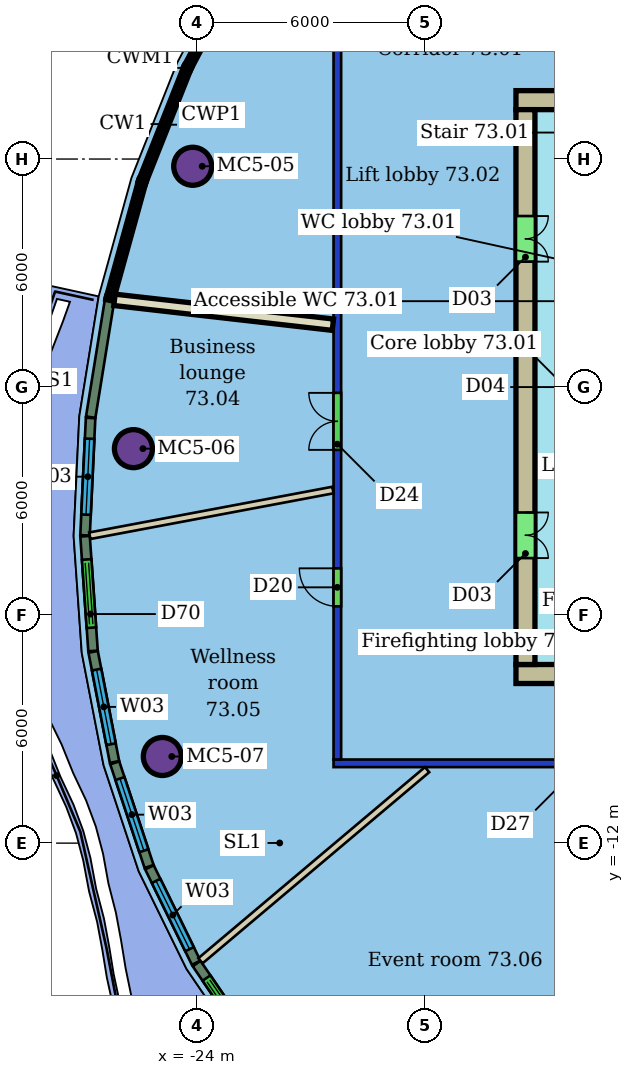
"""IFC4 building model, lengths in metres.
Left out: names, types, materials, properties, quantities, classifications, styles, units other than length and angle.
Written with IfcOpenShell. Run it as: python <this file> out.ifc"""

import sys

from ifc_helpers import new_model, si_unit, direction, frame, frame_2d, origin, origin_2d, place, context, subcontext, project, spatial, rectangle, hollow_circle, extrude, element, fill, save


model = new_model("IFC4")
c1 = context("Model", 3, precision=1e-05, world=origin(), true_north=direction((0.0, 1.0)))
c2 = subcontext(c1, "Body", "Model", "MODEL_VIEW")
j1 = project(units=[si_unit("LENGTHUNIT", "METRE"), si_unit("PLANEANGLEUNIT", "RADIAN")], contexts=[c1])
p1 = place(None, origin())
s1 = spatial("IfcSite", under=j1, at=p1, CompositionType="ELEMENT")
p2 = place(p1, origin())
s2 = spatial("IfcBuilding", under=s1, at=p2, CompositionType="ELEMENT")
p3 = place(p2, frame((0.0, 0.0, 293.7)))
s3 = spatial("IfcBuildingStorey", under=s2, at=p3, CompositionType="ELEMENT", Elevation=293.7)
for number, where, z_axis, x_axis in (
    (1, (-24.106, 5.81, 0.0), (0.0, 0.0, 1.0), (1.0, 0.0, 0.0)),
    (2, (-25.666, -1.62, 0.0), (0.0, 0.0, 1.0), (1.0, 0.0, 0.0)),
    (3, (-24.906, -9.72, 0.0), (0.0, 0.0, 1.0), (1.0, 0.0, 0.0)),
):
    element("IfcColumn", number, at=place(p3, frame(where, z_axis=z_axis, x_axis=x_axis)), inside=s3, PredefinedType="COLUMN", context=c2, shape_type="SweptSolid", body=[
        extrude(hollow_circle(Radius=0.5, WallThickness=0.04, at=origin_2d()), origin(), (0.0, 0.0, 1.0), 3.45),
    ])
p4 = place(p3, frame((8.4, -9.9, 0.0), z_axis=(0.0, 0.0, 1.0), x_axis=(-1.0, 0.0, 0.0)))
e4 = element("IfcWall", 4, at=p4, inside=s3, PredefinedType="PARTITIONING", context=c2, shape_type="SweptSolid", body=[
    extrude(rectangle(XDim=28.8, YDim=0.2, at=frame_2d((14.4, 0.0))), origin(), (0.0, 0.0, 1.0), 3.1),
])
p5 = place(p4, frame((20.815, 0.0, 0.0)))
e5 = element("IfcOpeningElement", 5, at=p5, cuts=e4, PredefinedType="OPENING", context=c2, shape_type="SweptSolid", body=[
    extrude(rectangle(XDim=1.8, YDim=2.4, at=frame_2d((0.9, 1.2))), frame((0.0, 0.11, 0.0), z_axis=(0.0, -1.0, 0.0), x_axis=(1.0, 0.0, 0.0)), (0.0, 0.0, 1.0), 0.22),
])
p6 = place(p4, frame((16.021, 0.0, 0.0)))
e6 = element("IfcOpeningElement", 6, at=p6, cuts=e4, PredefinedType="OPENING", context=c2, shape_type="SweptSolid", body=[
    extrude(rectangle(XDim=1.5, YDim=2.1, at=frame_2d((0.75, 1.05))), frame((0.0, 0.11, 0.0), z_axis=(0.0, -1.0, 0.0), x_axis=(1.0, 0.0, 0.0)), (0.0, 0.0, 1.0), 0.22),
])
p7 = place(p4, frame((9.891, 0.0, 0.0)))
e7 = element("IfcOpeningElement", 7, at=p7, cuts=e4, PredefinedType="OPENING", context=c2, shape_type="SweptSolid", body=[
    extrude(rectangle(XDim=0.9, YDim=2.1, at=frame_2d((0.45, 1.05))), frame((0.0, 0.11, 0.0), z_axis=(0.0, -1.0, 0.0), x_axis=(1.0, 0.0, 0.0)), (0.0, 0.0, 1.0), 0.22),
])
p8 = place(p4, frame((4.832, 0.0, 0.0)))
e8 = element("IfcOpeningElement", 8, at=p8, cuts=e4, PredefinedType="OPENING", context=c2, shape_type="SweptSolid", body=[
    extrude(rectangle(XDim=1.5, YDim=2.1, at=frame_2d((0.75, 1.05))), frame((0.0, 0.11, 0.0), z_axis=(0.0, -1.0, 0.0), x_axis=(1.0, 0.0, 0.0)), (0.0, 0.0, 1.0), 0.22),
])
p9 = place(p3, frame((-20.3, -9.8, 0.0), z_axis=(0.0, 0.0, 1.0), x_axis=(0.0, 1.0, 0.0)))
e9 = element("IfcWall", 9, at=p9, inside=s3, PredefinedType="PARTITIONING", context=c2, shape_type="SweptSolid", body=[
    extrude(rectangle(XDim=19.6, YDim=0.2, at=frame_2d((9.8, 0.0))), origin(), (0.0, 0.0, 1.0), 3.1),
])
p10 = place(p9, frame((8.147, 0.0, 0.0)))
e10 = element("IfcOpeningElement", 10, at=p10, cuts=e9, PredefinedType="OPENING", context=c2, shape_type="SweptSolid", body=[
    extrude(rectangle(XDim=1.5, YDim=2.1, at=frame_2d((0.75, 1.05))), frame((0.0, 0.11, 0.0), z_axis=(0.0, -1.0, 0.0), x_axis=(1.0, 0.0, 0.0)), (0.0, 0.0, 1.0), 0.22),
])
p11 = place(p9, frame((4.031, 0.0, 0.0)))
e11 = element("IfcOpeningElement", 11, at=p11, cuts=e9, PredefinedType="OPENING", context=c2, shape_type="SweptSolid", body=[
    extrude(rectangle(XDim=1.0, YDim=2.1, at=frame_2d((0.5, 1.05))), frame((0.0, 0.11, 0.0), z_axis=(0.0, -1.0, 0.0), x_axis=(1.0, 0.0, 0.0)), (0.0, 0.0, 1.0), 0.22),
])
p12 = place(p3, frame((-26.166, 2.295, 0.0), z_axis=(0.0, 0.0, 1.0), x_axis=(0.993584796014, -0.113089580112, 0.0)))
e12 = element("IfcWall", 12, at=p12, inside=s3, PredefinedType="PARTITIONING", context=c2, shape_type="SweptSolid", body=[
    extrude(rectangle(XDim=5.786, YDim=0.3, at=frame_2d((2.893, 0.0))), origin(), (0.0, 0.0, 1.0), 3.45),
])
p13 = place(p3, frame((-26.815, -3.912, 0.0), z_axis=(0.0, 0.0, 1.0), x_axis=(0.982791861664, 0.184716422243, 0.0)))
e13 = element("IfcWall", 13, at=p13, inside=s3, PredefinedType="PARTITIONING", context=c2, shape_type="SweptSolid", body=[
    extrude(rectangle(XDim=6.511, YDim=0.175, at=frame_2d((3.255, 0.0))), origin(), (0.0, 0.0, 1.0), 3.45),
])
p14 = place(p3, frame((-23.902, -15.095, 0.0), z_axis=(0.0, 0.0, 1.0), x_axis=(0.764496313842, 0.644628099079, 0.0)))
e14 = element("IfcWall", 14, at=p14, inside=s3, PredefinedType="PARTITIONING", context=c2, shape_type="SweptSolid", body=[
    extrude(rectangle(XDim=7.801, YDim=0.175, at=frame_2d((3.9, 0.0))), origin(), (0.0, 0.0, 1.0), 3.45),
])
p15 = place(p3, frame((-16.226, -22.213, 0.0), z_axis=(0.0, 0.0, 1.0), x_axis=(0.418174840515, 0.908366557487, 0.0)))
e15 = element("IfcWall", 15, at=p15, inside=s3, PredefinedType="PARTITIONING", context=c2, shape_type="SweptSolid", body=[
    extrude(rectangle(XDim=13.411, YDim=0.15, at=frame_2d((6.706, 0.0))), origin(), (0.0, 0.0, 1.0), 3.45),
])
p16 = place(p3, frame((-26.296, 2.268, 0.0), z_axis=(0.0, 0.0, 1.0), x_axis=(-0.159440477827, -0.987207543544, 0.0)))
e16 = element("IfcWall", 16, at=p16, inside=s3, PredefinedType="SOLIDWALL", context=c2, shape_type="SweptSolid", body=[
    extrude(rectangle(XDim=3.099, YDim=0.25, at=frame_2d((1.55, 0.0))), origin(), (0.0, 0.0, 1.0), 3.15),
])
p17 = place(p3, frame((-26.793, -0.814, 0.0), z_axis=(0.0, 0.0, 1.0), x_axis=(-0.047385042598, -0.998876697965, 0.0)))
e17 = element("IfcWall", 17, at=p17, inside=s3, PredefinedType="SOLIDWALL", context=c2, shape_type="SweptSolid", body=[
    extrude(rectangle(XDim=3.091, YDim=0.25, at=frame_2d((1.546, 0.0))), origin(), (0.0, 0.0, 1.0), 3.15),
])
p18 = place(p17, frame((0.546, 0.0, 0.9)))
e18 = element("IfcOpeningElement", 18, at=p18, cuts=e17, PredefinedType="OPENING", context=c2, shape_type="SweptSolid", body=[
    extrude(rectangle(XDim=2.0, YDim=2.1, at=frame_2d((1.0, 1.05))), frame((0.0, 0.135, 0.0), z_axis=(0.0, -1.0, 0.0), x_axis=(1.0, 0.0, 0.0)), (0.0, 0.0, 1.0), 0.27),
])
p19 = place(p3, frame((-26.939, -3.925, 0.0), z_axis=(0.0, 0.0, 1.0), x_axis=(0.069463827697, -0.997584470931, 0.0)))
e19 = element("IfcWall", 19, at=p19, inside=s3, PredefinedType="SOLIDWALL", context=c2, shape_type="SweptSolid", body=[
    extrude(rectangle(XDim=3.026, YDim=0.25, at=frame_2d((1.513, 0.0))), origin(), (0.0, 0.0, 1.0), 3.15),
])
p20 = place(p19, frame((0.613, 0.0, 0.0)))
e20 = element("IfcOpeningElement", 20, at=p20, cuts=e19, PredefinedType="OPENING", context=c2, shape_type="SweptSolid", body=[
    extrude(rectangle(XDim=1.8, YDim=2.4, at=frame_2d((0.9, 1.2))), frame((0.0, 0.135, 0.0), z_axis=(0.0, -1.0, 0.0), x_axis=(1.0, 0.0, 0.0)), (0.0, 0.0, 1.0), 0.27),
])
p21 = place(p3, frame((-26.726, -6.966, 0.0), z_axis=(0.0, 0.0, 1.0), x_axis=(0.190466761953, -0.981693644978, 0.0)))
e21 = element("IfcWall", 21, at=p21, inside=s3, PredefinedType="SOLIDWALL", context=c2, shape_type="SweptSolid", body=[
    extrude(rectangle(XDim=2.952, YDim=0.25, at=frame_2d((1.476, 0.0))), origin(), (0.0, 0.0, 1.0), 3.15),
])
p22 = place(p21, frame((0.476, 0.0, 0.9)))
e22 = element("IfcOpeningElement", 22, at=p22, cuts=e21, PredefinedType="OPENING", context=c2, shape_type="SweptSolid", body=[
    extrude(rectangle(XDim=2.0, YDim=2.1, at=frame_2d((1.0, 1.05))), frame((0.0, 0.135, 0.0), z_axis=(0.0, -1.0, 0.0), x_axis=(1.0, 0.0, 0.0)), (0.0, 0.0, 1.0), 0.27),
])
p23 = place(p3, frame((-26.157, -9.887, 0.0), z_axis=(0.0, 0.0, 1.0), x_axis=(0.314544485277, -0.949242733331, 0.0)))
e23 = element("IfcWall", 23, at=p23, inside=s3, PredefinedType="SOLIDWALL", context=c2, shape_type="SweptSolid", body=[
    extrude(rectangle(XDim=2.873, YDim=0.25, at=frame_2d((1.436, 0.0))), origin(), (0.0, 0.0, 1.0), 3.15),
])
p24 = place(p23, frame((0.436, 0.0, 0.9)))
e24 = element("IfcOpeningElement", 24, at=p24, cuts=e23, PredefinedType="OPENING", context=c2, shape_type="SweptSolid", body=[
    extrude(rectangle(XDim=2.0, YDim=2.1, at=frame_2d((1.0, 1.05))), frame((0.0, 0.135, 0.0), z_axis=(0.0, -1.0, 0.0), x_axis=(1.0, 0.0, 0.0)), (0.0, 0.0, 1.0), 0.27),
])
p25 = place(p3, frame((-25.244, -12.637, 0.0), z_axis=(0.0, 0.0, 1.0), x_axis=(0.439683351092, -0.898152854904, 0.0)))
e25 = element("IfcWall", 25, at=p25, inside=s3, PredefinedType="SOLIDWALL", context=c2, shape_type="SweptSolid", body=[
    extrude(rectangle(XDim=2.794, YDim=0.25, at=frame_2d((1.397, 0.0))), origin(), (0.0, 0.0, 1.0), 3.15),
])
p26 = place(p25, frame((0.397, 0.0, 0.9)))
e26 = element("IfcOpeningElement", 26, at=p26, cuts=e25, PredefinedType="OPENING", context=c2, shape_type="SweptSolid", body=[
    extrude(rectangle(XDim=2.0, YDim=2.1, at=frame_2d((1.0, 1.05))), frame((0.0, 0.135, 0.0), z_axis=(0.0, -1.0, 0.0), x_axis=(1.0, 0.0, 0.0)), (0.0, 0.0, 1.0), 0.27),
])
p27 = place(p3, frame((-24.003, -15.169, 0.0), z_axis=(0.0, 0.0, 1.0), x_axis=(0.562624043307, -0.826712879961, 0.0)))
e27 = element("IfcWall", 27, at=p27, inside=s3, PredefinedType="SOLIDWALL", context=c2, shape_type="SweptSolid", body=[
    extrude(rectangle(XDim=2.722, YDim=0.25, at=frame_2d((1.361, 0.0))), origin(), (0.0, 0.0, 1.0), 3.15),
])
p28 = place(p27, frame((0.461, 0.0, 0.0)))
e28 = element("IfcOpeningElement", 28, at=p28, cuts=e27, PredefinedType="OPENING", context=c2, shape_type="SweptSolid", body=[
    extrude(rectangle(XDim=1.8, YDim=2.4, at=frame_2d((0.9, 1.2))), frame((0.0, 0.135, 0.0), z_axis=(0.0, -1.0, 0.0), x_axis=(1.0, 0.0, 0.0)), (0.0, 0.0, 1.0), 0.27),
])
p29 = place(p3, frame((-6.0, 7.55, 0.0), z_axis=(0.0, 0.0, 1.0), x_axis=(-1.0, 0.0, 0.0)))
e29 = element("IfcWall", 29, at=p29, inside=s3, PredefinedType="SHEAR", context=c2, shape_type="SweptSolid", body=[
    extrude(rectangle(XDim=9.6, YDim=0.5, at=frame_2d((4.8, 0.0))), origin(), (0.0, 0.0, 1.0), 3.3),
])
p30 = place(p29, frame((5.2, 0.0, 0.0)))
e30 = element("IfcOpeningElement", 30, at=p30, cuts=e29, PredefinedType="OPENING", context=c2, shape_type="SweptSolid", body=[
    extrude(rectangle(XDim=1.2, YDim=2.1, at=frame_2d((0.6, 1.05))), frame((0.0, 0.26, 0.0), z_axis=(0.0, -1.0, 0.0), x_axis=(1.0, 0.0, 0.0)), (0.0, 0.0, 1.0), 0.52),
])
p31 = place(p3, frame((-15.6, -7.55, 0.0), z_axis=(0.0, 0.0, 1.0), x_axis=(1.0, 0.0, 0.0)))
e31 = element("IfcWall", 31, at=p31, inside=s3, PredefinedType="SHEAR", context=c2, shape_type="SweptSolid", body=[
    extrude(rectangle(XDim=19.2, YDim=0.5, at=frame_2d((9.6, 0.0))), origin(), (0.0, 0.0, 1.0), 3.3),
])
p32 = place(p31, frame((3.6, 0.0, 0.0)))
e32 = element("IfcOpeningElement", 32, at=p32, cuts=e31, PredefinedType="OPENING", context=c2, shape_type="SweptSolid", body=[
    extrude(rectangle(XDim=1.2, YDim=2.1, at=frame_2d((0.6, 1.05))), frame((0.0, 0.26, 0.0), z_axis=(0.0, -1.0, 0.0), x_axis=(1.0, 0.0, 0.0)), (0.0, 0.0, 1.0), 0.52),
])
p33 = place(p3, frame((-15.35, 7.3, 0.0), z_axis=(0.0, 0.0, 1.0), x_axis=(0.0, -1.0, 0.0)))
e33 = element("IfcWall", 33, at=p33, inside=s3, PredefinedType="SHEAR", context=c2, shape_type="SweptSolid", body=[
    extrude(rectangle(XDim=14.6, YDim=0.5, at=frame_2d((7.3, 0.0))), origin(), (0.0, 0.0, 1.0), 3.3),
])
p34 = place(p33, frame((10.6, 0.0, 0.0)))
e34 = element("IfcOpeningElement", 34, at=p34, cuts=e33, PredefinedType="OPENING", context=c2, shape_type="SweptSolid", body=[
    extrude(rectangle(XDim=1.2, YDim=2.1, at=frame_2d((0.6, 1.05))), frame((0.0, 0.26, 0.0), z_axis=(0.0, -1.0, 0.0), x_axis=(1.0, 0.0, 0.0)), (0.0, 0.0, 1.0), 0.52),
])
p35 = place(p33, frame((2.8, 0.0, 0.0)))
e35 = element("IfcOpeningElement", 35, at=p35, cuts=e33, PredefinedType="OPENING", context=c2, shape_type="SweptSolid", body=[
    extrude(rectangle(XDim=1.2, YDim=2.1, at=frame_2d((0.6, 1.05))), frame((0.0, 0.26, 0.0), z_axis=(0.0, -1.0, 0.0), x_axis=(1.0, 0.0, 0.0)), (0.0, 0.0, 1.0), 0.52),
])
p36 = place(p10, origin())
e36 = element("IfcDoor", 36, at=p36, inside=s3, OperationType="DOUBLE_DOOR_SINGLE_SWING", PredefinedType="DOOR", context=c2, shape_type="SweptSolid", body=[
    extrude(rectangle(XDim=1.5, YDim=2.1, at=frame_2d((0.75, 1.05))), frame((0.0, 0.025, 0.0), z_axis=(0.0, -1.0, 0.0), x_axis=(1.0, 0.0, 0.0)), (0.0, 0.0, 1.0), 0.05),
])
fill(e10, e36)
p37 = place(p11, origin())
e37 = element("IfcDoor", 37, at=p37, inside=s3, OperationType="SINGLE_SWING_RIGHT", PredefinedType="DOOR", context=c2, shape_type="SweptSolid", body=[
    extrude(rectangle(XDim=1.0, YDim=2.1, at=frame_2d((0.5, 1.05))), frame((0.0, 0.025, 0.0), z_axis=(0.0, -1.0, 0.0), x_axis=(1.0, 0.0, 0.0)), (0.0, 0.0, 1.0), 0.05),
])
fill(e11, e37)
p38 = place(p18, origin())
e38 = element("IfcWindow", 38, at=p38, inside=s3, PartitioningType="SINGLE_PANEL", PredefinedType="WINDOW", context=c2, shape_type="SweptSolid", body=[
    extrude(rectangle(XDim=2.0, YDim=2.1, at=frame_2d((1.0, 1.05))), frame((0.0, 0.03, 0.0), z_axis=(0.0, -1.0, 0.0), x_axis=(1.0, 0.0, 0.0)), (0.0, 0.0, 1.0), 0.06),
])
fill(e18, e38)
p39 = place(p20, origin())
e39 = element("IfcDoor", 39, at=p39, inside=s3, OperationType="DOUBLE_DOOR_SLIDING", PredefinedType="DOOR", context=c2, shape_type="SweptSolid", body=[
    extrude(rectangle(XDim=1.8, YDim=2.4, at=frame_2d((0.9, 1.2))), frame((0.0, 0.025, 0.0), z_axis=(0.0, -1.0, 0.0), x_axis=(1.0, 0.0, 0.0)), (0.0, 0.0, 1.0), 0.05),
])
fill(e20, e39)
p40 = place(p22, origin())
e40 = element("IfcWindow", 40, at=p40, inside=s3, PartitioningType="SINGLE_PANEL", PredefinedType="WINDOW", context=c2, shape_type="SweptSolid", body=[
    extrude(rectangle(XDim=2.0, YDim=2.1, at=frame_2d((1.0, 1.05))), frame((0.0, 0.03, 0.0), z_axis=(0.0, -1.0, 0.0), x_axis=(1.0, 0.0, 0.0)), (0.0, 0.0, 1.0), 0.06),
])
fill(e22, e40)
p41 = place(p24, origin())
e41 = element("IfcWindow", 41, at=p41, inside=s3, PartitioningType="SINGLE_PANEL", PredefinedType="WINDOW", context=c2, shape_type="SweptSolid", body=[
    extrude(rectangle(XDim=2.0, YDim=2.1, at=frame_2d((1.0, 1.05))), frame((0.0, 0.03, 0.0), z_axis=(0.0, -1.0, 0.0), x_axis=(1.0, 0.0, 0.0)), (0.0, 0.0, 1.0), 0.06),
])
fill(e24, e41)
p42 = place(p26, origin())
e42 = element("IfcWindow", 42, at=p42, inside=s3, PartitioningType="SINGLE_PANEL", PredefinedType="WINDOW", context=c2, shape_type="SweptSolid", body=[
    extrude(rectangle(XDim=2.0, YDim=2.1, at=frame_2d((1.0, 1.05))), frame((0.0, 0.03, 0.0), z_axis=(0.0, -1.0, 0.0), x_axis=(1.0, 0.0, 0.0)), (0.0, 0.0, 1.0), 0.06),
])
fill(e26, e42)
p43 = place(p28, origin())
e43 = element("IfcDoor", 43, at=p43, inside=s3, OperationType="DOUBLE_DOOR_SLIDING", PredefinedType="DOOR", context=c2, shape_type="SweptSolid", body=[
    extrude(rectangle(XDim=1.8, YDim=2.4, at=frame_2d((0.9, 1.2))), frame((0.0, 0.025, 0.0), z_axis=(0.0, -1.0, 0.0), x_axis=(1.0, 0.0, 0.0)), (0.0, 0.0, 1.0), 0.05),
])
fill(e28, e43)
p44 = place(p34, origin())
e44 = element("IfcDoor", 44, at=p44, inside=s3, OperationType="DOUBLE_DOOR_SINGLE_SWING", PredefinedType="NOTDEFINED", context=c2, shape_type="SweptSolid", body=[
    extrude(rectangle(XDim=1.2, YDim=2.1, at=frame_2d((0.6, 1.05))), frame((0.0, 0.025, 0.0), z_axis=(0.0, -1.0, 0.0), x_axis=(1.0, 0.0, 0.0)), (0.0, 0.0, 1.0), 0.05),
])
fill(e34, e44)
p45 = place(p35, origin())
e45 = element("IfcDoor", 45, at=p45, inside=s3, OperationType="DOUBLE_DOOR_SINGLE_SWING", PredefinedType="NOTDEFINED", context=c2, shape_type="SweptSolid", body=[
    extrude(rectangle(XDim=1.2, YDim=2.1, at=frame_2d((0.6, 1.05))), frame((0.0, 0.025, 0.0), z_axis=(0.0, -1.0, 0.0), x_axis=(1.0, 0.0, 0.0)), (0.0, 0.0, 1.0), 0.05),
])
fill(e35, e45)
save(model, sys.argv[1])
